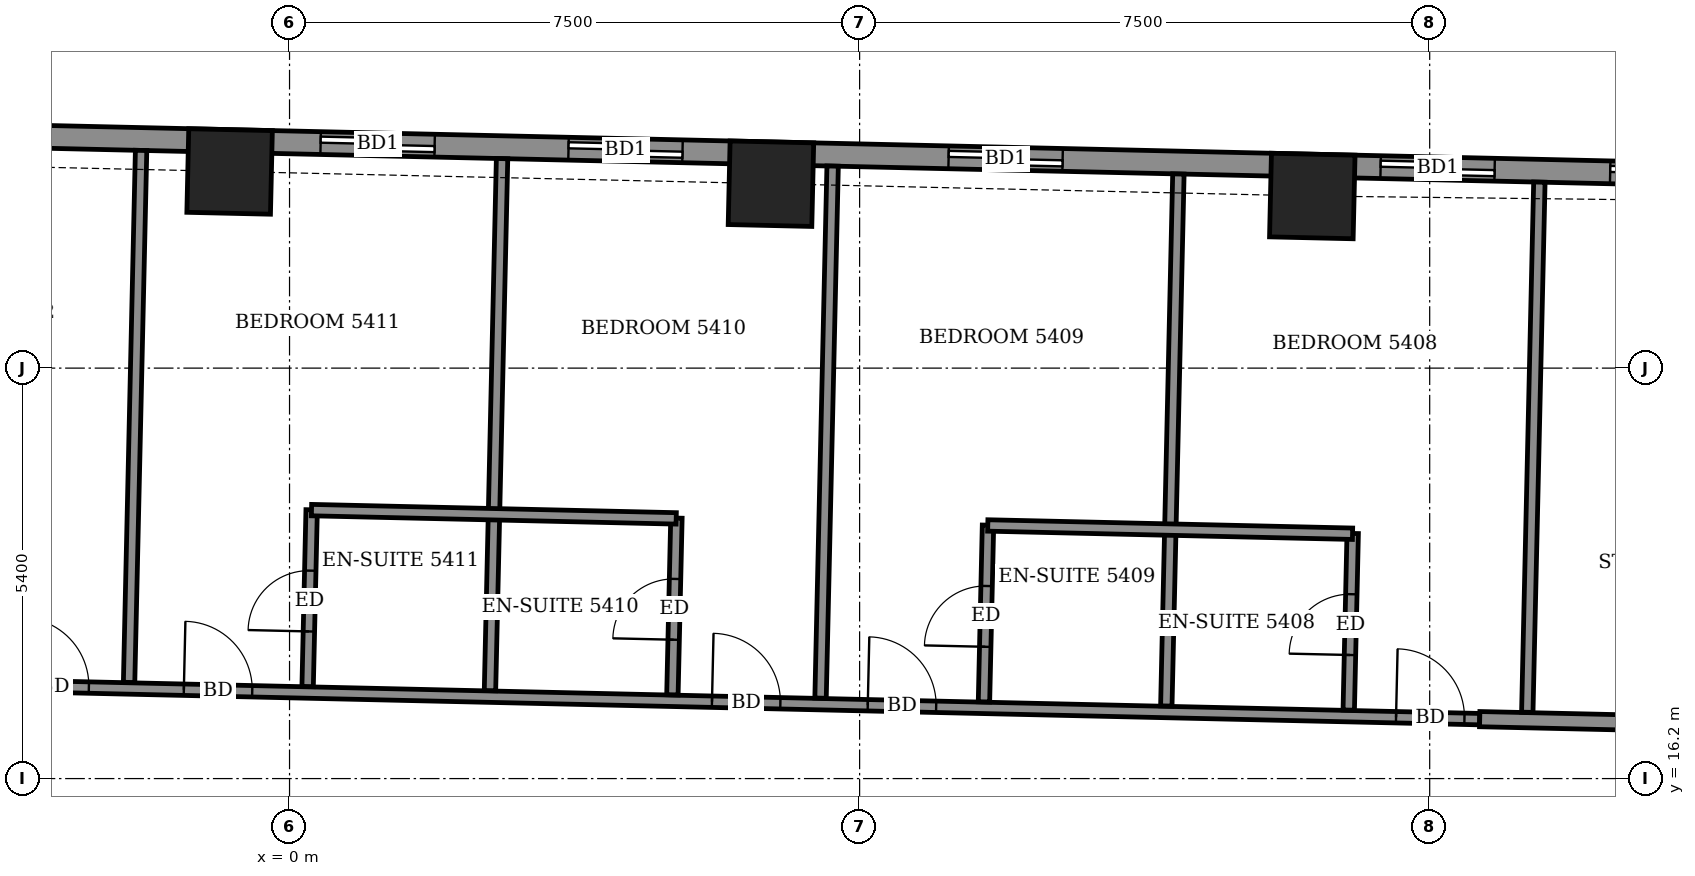
"""IFC4 building model, lengths in metres.
Left out: names, types, materials, properties, quantities, classifications, styles, units other than length and angle.
Written with IfcOpenShell. Run it as: python <this file> out.ifc"""

import sys

from ifc_helpers import new_model, si_unit, direction, frame, frame_2d, origin, origin_2d, place, context, subcontext, project, spatial, rectangle, extrude, element, fill, save


model = new_model("IFC4")
c1 = context("Model", 3, precision=1e-05, world=origin(), true_north=direction((0.0, 1.0)))
c2 = subcontext(c1, "Body", "Model", "MODEL_VIEW")
j1 = project(units=[si_unit("LENGTHUNIT", "METRE"), si_unit("PLANEANGLEUNIT", "RADIAN")], contexts=[c1])
p1 = place(None, origin())
s1 = spatial("IfcSite", under=j1, at=p1, CompositionType="ELEMENT")
p2 = place(p1, origin())
s2 = spatial("IfcBuilding", under=s1, at=p2, CompositionType="ELEMENT")
p3 = place(p2, frame((0.0, 0.0, 212.3)))
s3 = spatial("IfcBuildingStorey", under=s2, at=p3, CompositionType="ELEMENT", Elevation=212.3)
for number, where, z_axis, x_axis in (
    (1, (13.456, 23.864, -0.55), (0.0, 0.0, 1.0), (-1.0, 0.023, 0.0)),
    (2, (6.333, 24.026, -0.55), (0.0, 0.0, 1.0), (-1.0, 0.023, 0.0)),
    (3, (-0.789, 24.187, -0.55), (0.0, 0.0, 1.0), (-1.0, 0.023, 0.0)),
):
    element("IfcColumn", number, at=place(p3, frame(where, z_axis=z_axis, x_axis=x_axis)), inside=s3, PredefinedType="COLUMN", context=c2, shape_type="SweptSolid", body=[
        extrude(rectangle(XDim=1.1, YDim=1.1, at=origin_2d()), origin(), (0.0, 0.0, 1.0), 3.6),
    ])
p4 = place(p3, frame((20.437, 24.106, 0.0), z_axis=(0.0, 0.0, 1.0), x_axis=(-0.999742506232, 0.022691875925, 0.0)))
e4 = element("IfcWall", 4, at=p4, inside=s3, PredefinedType="SOLIDWALL", context=c2, shape_type="SweptSolid", body=[
    extrude(rectangle(XDim=42.444, YDim=0.3, at=frame_2d((21.222, 0.0))), origin(), (0.0, 0.0, 1.0), 2.55),
])
p5 = place(p4, frame((1.563, 0.0, 0.0)))
e5 = element("IfcOpeningElement", 5, at=p5, cuts=e4, PredefinedType="OPENING", context=c2, shape_type="SweptSolid", body=[
    extrude(rectangle(XDim=1.5, YDim=2.4, at=frame_2d((0.75, 1.2))), frame((0.0, 0.16, 0.0), z_axis=(0.0, -1.0, 0.0), x_axis=(1.0, 0.0, 0.0)), (0.0, 0.0, 1.0), 0.32),
])
p6 = place(p4, frame((4.584, 0.0, 0.0)))
e6 = element("IfcOpeningElement", 6, at=p6, cuts=e4, PredefinedType="OPENING", context=c2, shape_type="SweptSolid", body=[
    extrude(rectangle(XDim=1.5, YDim=2.4, at=frame_2d((0.75, 1.2))), frame((0.0, 0.16, 0.0), z_axis=(0.0, -1.0, 0.0), x_axis=(1.0, 0.0, 0.0)), (0.0, 0.0, 1.0), 0.32),
])
p7 = place(p4, frame((10.269, 0.0, 0.0)))
e7 = element("IfcOpeningElement", 7, at=p7, cuts=e4, PredefinedType="OPENING", context=c2, shape_type="SweptSolid", body=[
    extrude(rectangle(XDim=1.5, YDim=2.4, at=frame_2d((0.75, 1.2))), frame((0.0, 0.16, 0.0), z_axis=(0.0, -1.0, 0.0), x_axis=(1.0, 0.0, 0.0)), (0.0, 0.0, 1.0), 0.32),
])
p8 = place(p4, frame((15.271, 0.0, 0.0)))
e8 = element("IfcOpeningElement", 8, at=p8, cuts=e4, PredefinedType="OPENING", context=c2, shape_type="SweptSolid", body=[
    extrude(rectangle(XDim=1.5, YDim=2.4, at=frame_2d((0.75, 1.2))), frame((0.0, 0.16, 0.0), z_axis=(0.0, -1.0, 0.0), x_axis=(1.0, 0.0, 0.0)), (0.0, 0.0, 1.0), 0.32),
])
p9 = place(p4, frame((18.533, 0.0, 0.0)))
e9 = element("IfcOpeningElement", 9, at=p9, cuts=e4, PredefinedType="OPENING", context=c2, shape_type="SweptSolid", body=[
    extrude(rectangle(XDim=1.5, YDim=2.4, at=frame_2d((0.75, 1.2))), frame((0.0, 0.16, 0.0), z_axis=(0.0, -1.0, 0.0), x_axis=(1.0, 0.0, 0.0)), (0.0, 0.0, 1.0), 0.32),
])
p10 = place(p4, frame((23.819, 0.0, 0.0)))
e10 = element("IfcOpeningElement", 10, at=p10, cuts=e4, PredefinedType="OPENING", context=c2, shape_type="SweptSolid", body=[
    extrude(rectangle(XDim=1.5, YDim=2.4, at=frame_2d((0.75, 1.2))), frame((0.0, 0.16, 0.0), z_axis=(0.0, -1.0, 0.0), x_axis=(1.0, 0.0, 0.0)), (0.0, 0.0, 1.0), 0.32),
])
p11 = place(p4, frame((29.345, 0.0, 0.0)))
e11 = element("IfcOpeningElement", 11, at=p11, cuts=e4, PredefinedType="OPENING", context=c2, shape_type="SweptSolid", body=[
    extrude(rectangle(XDim=1.5, YDim=2.4, at=frame_2d((0.75, 1.2))), frame((0.0, 0.16, 0.0), z_axis=(0.0, -1.0, 0.0), x_axis=(1.0, 0.0, 0.0)), (0.0, 0.0, 1.0), 0.32),
])
p12 = place(p4, frame((32.607, 0.0, 0.0)))
e12 = element("IfcOpeningElement", 12, at=p12, cuts=e4, PredefinedType="OPENING", context=c2, shape_type="SweptSolid", body=[
    extrude(rectangle(XDim=1.5, YDim=2.4, at=frame_2d((0.75, 1.2))), frame((0.0, 0.16, 0.0), z_axis=(0.0, -1.0, 0.0), x_axis=(1.0, 0.0, 0.0)), (0.0, 0.0, 1.0), 0.32),
])
p13 = place(p4, frame((37.783, 0.0, 0.9)))
e13 = element("IfcOpeningElement", 13, at=p13, cuts=e4, PredefinedType="OPENING", context=c2, shape_type="SweptSolid", body=[
    extrude(rectangle(XDim=2.4, YDim=1.5, at=frame_2d((1.2, 0.75))), frame((0.0, 0.16, 0.0), z_axis=(0.0, -1.0, 0.0), x_axis=(1.0, 0.0, 0.0)), (0.0, 0.0, 1.0), 0.32),
])
p14 = place(p3, frame((-14.871, 17.675, 0.0), z_axis=(0.0, 0.0, 1.0), x_axis=(0.999742359486, -0.02269834024, 0.0)))
e14 = element("IfcWall", 14, at=p14, inside=s3, PredefinedType="PARTITIONING", context=c2, shape_type="SweptSolid", body=[
    extrude(rectangle(XDim=30.536, YDim=0.15, at=frame_2d((15.268, 0.0))), origin(), (0.0, 0.0, 1.0), 3.05),
])
p15 = place(p14, frame((29.436, 0.0, 0.0)))
e15 = element("IfcOpeningElement", 15, at=p15, cuts=e14, PredefinedType="OPENING", context=c2, shape_type="SweptSolid", body=[
    extrude(rectangle(XDim=0.9, YDim=2.1, at=frame_2d((0.45, 1.05))), frame((0.0, 0.085, 0.0), z_axis=(0.0, -1.0, 0.0), x_axis=(1.0, 0.0, 0.0)), (0.0, 0.0, 1.0), 0.17),
])
p16 = place(p14, frame((22.484, 0.0, 0.0)))
e16 = element("IfcOpeningElement", 16, at=p16, cuts=e14, PredefinedType="OPENING", context=c2, shape_type="SweptSolid", body=[
    extrude(rectangle(XDim=0.9, YDim=2.1, at=frame_2d((0.45, 1.05))), frame((0.0, 0.085, 0.0), z_axis=(0.0, -1.0, 0.0), x_axis=(1.0, 0.0, 0.0)), (0.0, 0.0, 1.0), 0.17),
])
p17 = place(p14, frame((20.434, 0.0, 0.0)))
e17 = element("IfcOpeningElement", 17, at=p17, cuts=e14, PredefinedType="OPENING", context=c2, shape_type="SweptSolid", body=[
    extrude(rectangle(XDim=0.9, YDim=2.1, at=frame_2d((0.45, 1.05))), frame((0.0, 0.085, 0.0), z_axis=(0.0, -1.0, 0.0), x_axis=(1.0, 0.0, 0.0)), (0.0, 0.0, 1.0), 0.17),
])
p18 = place(p14, frame((13.484, 0.0, 0.0)))
e18 = element("IfcOpeningElement", 18, at=p18, cuts=e14, PredefinedType="OPENING", context=c2, shape_type="SweptSolid", body=[
    extrude(rectangle(XDim=0.9, YDim=2.1, at=frame_2d((0.45, 1.05))), frame((0.0, 0.085, 0.0), z_axis=(0.0, -1.0, 0.0), x_axis=(1.0, 0.0, 0.0)), (0.0, 0.0, 1.0), 0.17),
])
p19 = place(p14, frame((11.334, 0.0, 0.0)))
e19 = element("IfcOpeningElement", 19, at=p19, cuts=e14, PredefinedType="OPENING", context=c2, shape_type="SweptSolid", body=[
    extrude(rectangle(XDim=0.9, YDim=2.1, at=frame_2d((0.45, 1.05))), frame((0.0, 0.085, 0.0), z_axis=(0.0, -1.0, 0.0), x_axis=(1.0, 0.0, 0.0)), (0.0, 0.0, 1.0), 0.17),
])
p20 = place(p14, frame((4.359, 0.0, 0.0)))
e20 = element("IfcOpeningElement", 20, at=p20, cuts=e14, PredefinedType="OPENING", context=c2, shape_type="SweptSolid", body=[
    extrude(rectangle(XDim=0.9, YDim=2.1, at=frame_2d((0.45, 1.05))), frame((0.0, 0.085, 0.0), z_axis=(0.0, -1.0, 0.0), x_axis=(1.0, 0.0, 0.0)), (0.0, 0.0, 1.0), 0.17),
])
p21 = place(p14, frame((2.009, 0.0, 0.0)))
e21 = element("IfcOpeningElement", 21, at=p21, cuts=e14, PredefinedType="OPENING", context=c2, shape_type="SweptSolid", body=[
    extrude(rectangle(XDim=0.9, YDim=2.1, at=frame_2d((0.45, 1.05))), frame((0.0, 0.085, 0.0), z_axis=(0.0, -1.0, 0.0), x_axis=(1.0, 0.0, 0.0)), (0.0, 0.0, 1.0), 0.17),
])
p22 = place(p3, frame((15.658, 16.982, 0.0), z_axis=(0.0, 0.0, 1.0), x_axis=(0.99974485859, -0.022587999516, 0.0)))
e22 = element("IfcWall", 22, at=p22, inside=s3, PredefinedType="PARTITIONING", context=c2, shape_type="SweptSolid", body=[
    extrude(rectangle(XDim=7.566, YDim=0.2, at=frame_2d((3.783, 0.0))), origin(), (0.0, 0.0, 1.0), 3.05),
])
p23 = place(p22, frame((3.658, 0.0, 0.0)))
e23 = element("IfcOpeningElement", 23, at=p23, cuts=e22, PredefinedType="OPENING", context=c2, shape_type="SweptSolid", body=[
    extrude(rectangle(XDim=1.0, YDim=2.1, at=frame_2d((0.5, 1.05))), frame((0.0, 0.11, 0.0), z_axis=(0.0, -1.0, 0.0), x_axis=(1.0, 0.0, 0.0)), (0.0, 0.0, 1.0), 0.22),
])
p24 = place(p3, frame((-2.111, 17.465, 0.0), z_axis=(0.0, 0.0, 1.0), x_axis=(0.022597827698, 0.999744636486, 0.0)))
e24 = element("IfcWall", 24, at=p24, inside=s3, PredefinedType="PARTITIONING", context=c2, shape_type="SweptSolid", body=[
    extrude(rectangle(XDim=7.001, YDim=0.15, at=frame_2d((3.5, 0.0))), origin(), (0.0, 0.0, 1.0), 2.5),
])
p25 = place(p3, frame((0.238, 17.411, 0.0), z_axis=(0.0, 0.0, 1.0), x_axis=(0.022778632478, 0.99974053329, 0.0)))
e25 = element("IfcWall", 25, at=p25, inside=s3, PredefinedType="PARTITIONING", context=c2, shape_type="SweptSolid", body=[
    extrude(rectangle(XDim=2.326, YDim=0.15, at=frame_2d((1.163, 0.0))), origin(), (0.0, 0.0, 1.0), 3.05),
])
p26 = place(p25, frame((0.725, 0.0, 0.0)))
e26 = element("IfcOpeningElement", 26, at=p26, cuts=e25, PredefinedType="OPENING", context=c2, shape_type="SweptSolid", body=[
    extrude(rectangle(XDim=0.8, YDim=2.1, at=frame_2d((0.4, 1.05))), frame((0.0, 0.085, 0.0), z_axis=(0.0, -1.0, 0.0), x_axis=(1.0, 0.0, 0.0)), (0.0, 0.0, 1.0), 0.17),
])
p27 = place(p3, frame((2.637, 17.357, 0.0), z_axis=(0.0, 0.0, 1.0), x_axis=(0.022702393474, 0.999742267452, 0.0)))
e27 = element("IfcWall", 27, at=p27, inside=s3, PredefinedType="PARTITIONING", context=c2, shape_type="SweptSolid", body=[
    extrude(rectangle(XDim=7.001, YDim=0.15, at=frame_2d((3.5, 0.0))), origin(), (0.0, 0.0, 1.0), 2.5),
])
p28 = place(p3, frame((5.037, 17.302, 0.0), z_axis=(0.0, 0.0, 1.0), x_axis=(0.022781023197, 0.999740478815, 0.0)))
e28 = element("IfcWall", 28, at=p28, inside=s3, PredefinedType="PARTITIONING", context=c2, shape_type="SweptSolid", body=[
    extrude(rectangle(XDim=2.325, YDim=0.15, at=frame_2d((1.163, 0.0))), origin(), (0.0, 0.0, 1.0), 3.05),
])
p29 = place(p28, frame((0.725, 0.0, 0.0)))
e29 = element("IfcOpeningElement", 29, at=p29, cuts=e28, PredefinedType="OPENING", context=c2, shape_type="SweptSolid", body=[
    extrude(rectangle(XDim=0.8, YDim=2.1, at=frame_2d((0.4, 1.05))), frame((0.0, 0.085, 0.0), z_axis=(0.0, -1.0, 0.0), x_axis=(1.0, 0.0, 0.0)), (0.0, 0.0, 1.0), 0.17),
])
p30 = place(p3, frame((6.986, 17.258, 0.0), z_axis=(0.0, 0.0, 1.0), x_axis=(0.022699227919, 0.999742339331, 0.0)))
e30 = element("IfcWall", 30, at=p30, inside=s3, PredefinedType="PARTITIONING", context=c2, shape_type="SweptSolid", body=[
    extrude(rectangle(XDim=7.002, YDim=0.15, at=frame_2d((3.501, 0.0))), origin(), (0.0, 0.0, 1.0), 2.5),
])
p31 = place(p3, frame((9.136, 17.209, 0.0), z_axis=(0.0, 0.0, 1.0), x_axis=(0.022781023197, 0.999740478815, 0.0)))
e31 = element("IfcWall", 31, at=p31, inside=s3, PredefinedType="PARTITIONING", context=c2, shape_type="SweptSolid", body=[
    extrude(rectangle(XDim=2.325, YDim=0.15, at=frame_2d((1.163, 0.0))), origin(), (0.0, 0.0, 1.0), 3.05),
])
p32 = place(p31, frame((0.725, 0.0, 0.0)))
e32 = element("IfcOpeningElement", 32, at=p32, cuts=e31, PredefinedType="OPENING", context=c2, shape_type="SweptSolid", body=[
    extrude(rectangle(XDim=0.8, YDim=2.1, at=frame_2d((0.4, 1.05))), frame((0.0, 0.085, 0.0), z_axis=(0.0, -1.0, 0.0), x_axis=(1.0, 0.0, 0.0)), (0.0, 0.0, 1.0), 0.17),
])
p33 = place(p3, frame((11.535, 17.155, 0.0), z_axis=(0.0, 0.0, 1.0), x_axis=(0.022737248567, 0.999741475346, 0.0)))
e33 = element("IfcWall", 33, at=p33, inside=s3, PredefinedType="PARTITIONING", context=c2, shape_type="SweptSolid", body=[
    extrude(rectangle(XDim=7.001, YDim=0.15, at=frame_2d((3.5, 0.0))), origin(), (0.0, 0.0, 1.0), 2.5),
])
p34 = place(p3, frame((13.935, 17.101, 0.0), z_axis=(0.0, 0.0, 1.0), x_axis=(0.022370700241, 0.999749744571, 0.0)))
e34 = element("IfcWall", 34, at=p34, inside=s3, PredefinedType="PARTITIONING", context=c2, shape_type="SweptSolid", body=[
    extrude(rectangle(XDim=2.324, YDim=0.15, at=frame_2d((1.162, 0.0))), origin(), (0.0, 0.0, 1.0), 3.05),
])
p35 = place(p34, frame((0.725, 0.0, 0.0)))
e35 = element("IfcOpeningElement", 35, at=p35, cuts=e34, PredefinedType="OPENING", context=c2, shape_type="SweptSolid", body=[
    extrude(rectangle(XDim=0.8, YDim=2.1, at=frame_2d((0.4, 1.05))), frame((0.0, 0.085, 0.0), z_axis=(0.0, -1.0, 0.0), x_axis=(1.0, 0.0, 0.0)), (0.0, 0.0, 1.0), 0.17),
])
p36 = place(p3, frame((16.284, 17.072, 0.0), z_axis=(0.0, 0.0, 1.0), x_axis=(0.022815200701, 0.99973969943, 0.0)))
e36 = element("IfcWall", 36, at=p36, inside=s3, PredefinedType="PARTITIONING", context=c2, shape_type="SweptSolid", body=[
    extrude(rectangle(XDim=6.977, YDim=0.15, at=frame_2d((3.488, 0.0))), origin(), (0.0, 0.0, 1.0), 2.55),
])
p37 = place(p3, frame((0.289, 19.732, 0.0), z_axis=(0.0, 0.0, 1.0), x_axis=(0.999742570398, -0.022689048768, 0.0)))
e37 = element("IfcWall", 37, at=p37, inside=s3, PredefinedType="PARTITIONING", context=c2, shape_type="SweptSolid", body=[
    extrude(rectangle(XDim=4.799, YDim=0.15, at=frame_2d((2.399, 0.0))), origin(), (0.0, 0.0, 1.0), 3.05),
])
p38 = place(p3, frame((9.186, 19.53, 0.0), z_axis=(0.0, 0.0, 1.0), x_axis=(0.99974154664, -0.022734113616, 0.0)))
e38 = element("IfcWall", 38, at=p38, inside=s3, PredefinedType="PARTITIONING", context=c2, shape_type="SweptSolid", body=[
    extrude(rectangle(XDim=4.8, YDim=0.15, at=frame_2d((2.4, 0.0))), origin(), (0.0, 0.0, 1.0), 3.05),
])
p39 = place(p5, origin())
e39 = element("IfcDoor", 39, at=p39, inside=s3, OperationType="SLIDING_TO_LEFT", PredefinedType="DOOR", context=c2, shape_type="SweptSolid", body=[
    extrude(rectangle(XDim=1.5, YDim=2.4, at=frame_2d((0.75, 1.2))), frame((0.0, 0.025, 0.0), z_axis=(0.0, -1.0, 0.0), x_axis=(1.0, 0.0, 0.0)), (0.0, 0.0, 1.0), 0.05),
])
fill(e5, e39)
p40 = place(p6, origin())
e40 = element("IfcDoor", 40, at=p40, inside=s3, OperationType="SLIDING_TO_LEFT", PredefinedType="DOOR", context=c2, shape_type="SweptSolid", body=[
    extrude(rectangle(XDim=1.5, YDim=2.4, at=frame_2d((0.75, 1.2))), frame((0.0, 0.025, 0.0), z_axis=(0.0, -1.0, 0.0), x_axis=(1.0, 0.0, 0.0)), (0.0, 0.0, 1.0), 0.05),
])
fill(e6, e40)
p41 = place(p7, origin())
e41 = element("IfcDoor", 41, at=p41, inside=s3, OperationType="SLIDING_TO_LEFT", PredefinedType="DOOR", context=c2, shape_type="SweptSolid", body=[
    extrude(rectangle(XDim=1.5, YDim=2.4, at=frame_2d((0.75, 1.2))), frame((0.0, 0.025, 0.0), z_axis=(0.0, -1.0, 0.0), x_axis=(1.0, 0.0, 0.0)), (0.0, 0.0, 1.0), 0.05),
])
fill(e7, e41)
p42 = place(p8, origin())
e42 = element("IfcDoor", 42, at=p42, inside=s3, OperationType="SLIDING_TO_LEFT", PredefinedType="DOOR", context=c2, shape_type="SweptSolid", body=[
    extrude(rectangle(XDim=1.5, YDim=2.4, at=frame_2d((0.75, 1.2))), frame((0.0, 0.025, 0.0), z_axis=(0.0, -1.0, 0.0), x_axis=(1.0, 0.0, 0.0)), (0.0, 0.0, 1.0), 0.05),
])
fill(e8, e42)
p43 = place(p9, origin())
e43 = element("IfcDoor", 43, at=p43, inside=s3, OperationType="SLIDING_TO_LEFT", PredefinedType="DOOR", context=c2, shape_type="SweptSolid", body=[
    extrude(rectangle(XDim=1.5, YDim=2.4, at=frame_2d((0.75, 1.2))), frame((0.0, 0.025, 0.0), z_axis=(0.0, -1.0, 0.0), x_axis=(1.0, 0.0, 0.0)), (0.0, 0.0, 1.0), 0.05),
])
fill(e9, e43)
p44 = place(p15, origin())
e44 = element("IfcDoor", 44, at=p44, inside=s3, OperationType="SINGLE_SWING_RIGHT", PredefinedType="DOOR", context=c2, shape_type="SweptSolid", body=[
    extrude(rectangle(XDim=0.9, YDim=2.1, at=frame_2d((0.45, 1.05))), frame((0.0, 0.025, 0.0), z_axis=(0.0, -1.0, 0.0), x_axis=(1.0, 0.0, 0.0)), (0.0, 0.0, 1.0), 0.05),
])
fill(e15, e44)
p45 = place(p35, origin())
e45 = element("IfcDoor", 45, at=p45, inside=s3, OperationType="SINGLE_SWING_RIGHT", PredefinedType="DOOR", context=c2, shape_type="SweptSolid", body=[
    extrude(rectangle(XDim=0.8, YDim=2.1, at=frame_2d((0.4, 1.05))), frame((0.0, 0.025, 0.0), z_axis=(0.0, -1.0, 0.0), x_axis=(1.0, 0.0, 0.0)), (0.0, 0.0, 1.0), 0.05),
])
fill(e35, e45)
p46 = place(p16, origin())
e46 = element("IfcDoor", 46, at=p46, inside=s3, OperationType="SINGLE_SWING_LEFT", PredefinedType="DOOR", context=c2, shape_type="SweptSolid", body=[
    extrude(rectangle(XDim=0.9, YDim=2.1, at=frame_2d((0.45, 1.05))), frame((0.0, 0.025, 0.0), z_axis=(0.0, -1.0, 0.0), x_axis=(1.0, 0.0, 0.0)), (0.0, 0.0, 1.0), 0.05),
])
fill(e16, e46)
p47 = place(p32, origin())
e47 = element("IfcDoor", 47, at=p47, inside=s3, OperationType="SINGLE_SWING_LEFT", PredefinedType="DOOR", context=c2, shape_type="SweptSolid", body=[
    extrude(rectangle(XDim=0.8, YDim=2.1, at=frame_2d((0.4, 1.05))), frame((0.0, 0.025, 0.0), z_axis=(0.0, -1.0, 0.0), x_axis=(1.0, 0.0, 0.0)), (0.0, 0.0, 1.0), 0.05),
])
fill(e32, e47)
p48 = place(p17, origin())
e48 = element("IfcDoor", 48, at=p48, inside=s3, OperationType="SINGLE_SWING_RIGHT", PredefinedType="DOOR", context=c2, shape_type="SweptSolid", body=[
    extrude(rectangle(XDim=0.9, YDim=2.1, at=frame_2d((0.45, 1.05))), frame((0.0, 0.025, 0.0), z_axis=(0.0, -1.0, 0.0), x_axis=(1.0, 0.0, 0.0)), (0.0, 0.0, 1.0), 0.05),
])
fill(e17, e48)
p49 = place(p29, origin())
e49 = element("IfcDoor", 49, at=p49, inside=s3, OperationType="SINGLE_SWING_RIGHT", PredefinedType="DOOR", context=c2, shape_type="SweptSolid", body=[
    extrude(rectangle(XDim=0.8, YDim=2.1, at=frame_2d((0.4, 1.05))), frame((0.0, 0.025, 0.0), z_axis=(0.0, -1.0, 0.0), x_axis=(1.0, 0.0, 0.0)), (0.0, 0.0, 1.0), 0.05),
])
fill(e29, e49)
p50 = place(p18, origin())
e50 = element("IfcDoor", 50, at=p50, inside=s3, OperationType="SINGLE_SWING_LEFT", PredefinedType="DOOR", context=c2, shape_type="SweptSolid", body=[
    extrude(rectangle(XDim=0.9, YDim=2.1, at=frame_2d((0.45, 1.05))), frame((0.0, 0.025, 0.0), z_axis=(0.0, -1.0, 0.0), x_axis=(1.0, 0.0, 0.0)), (0.0, 0.0, 1.0), 0.05),
])
fill(e18, e50)
p51 = place(p26, origin())
e51 = element("IfcDoor", 51, at=p51, inside=s3, OperationType="SINGLE_SWING_LEFT", PredefinedType="DOOR", context=c2, shape_type="SweptSolid", body=[
    extrude(rectangle(XDim=0.8, YDim=2.1, at=frame_2d((0.4, 1.05))), frame((0.0, 0.025, 0.0), z_axis=(0.0, -1.0, 0.0), x_axis=(1.0, 0.0, 0.0)), (0.0, 0.0, 1.0), 0.05),
])
fill(e26, e51)
p52 = place(p19, origin())
e52 = element("IfcDoor", 52, at=p52, inside=s3, OperationType="SINGLE_SWING_RIGHT", PredefinedType="DOOR", context=c2, shape_type="SweptSolid", body=[
    extrude(rectangle(XDim=0.9, YDim=2.1, at=frame_2d((0.45, 1.05))), frame((0.0, 0.025, 0.0), z_axis=(0.0, -1.0, 0.0), x_axis=(1.0, 0.0, 0.0)), (0.0, 0.0, 1.0), 0.05),
])
fill(e19, e52)
save(model, sys.argv[1])
